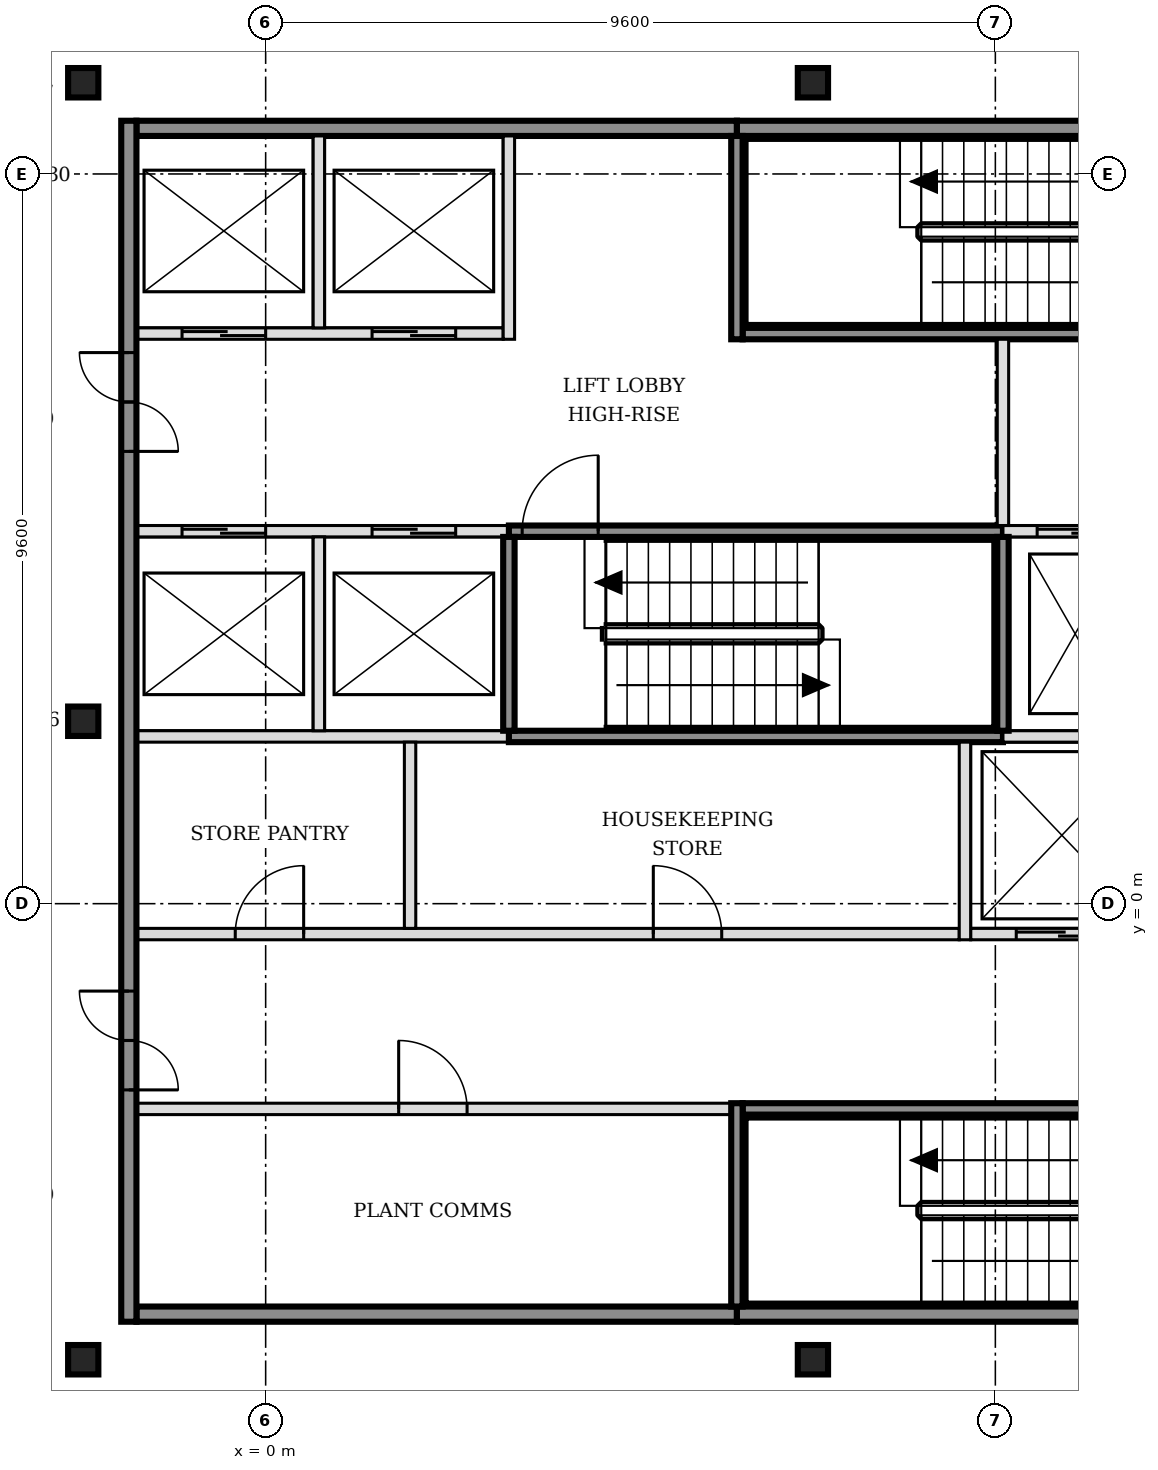
"""IFC4 building model, lengths in metres.
Left out: names, types, materials, properties, quantities, classifications, styles, units other than length and angle.
Written with IfcOpenShell. Run it as: python <this file> out.ifc"""

import sys

from ifc_helpers import new_model, si_unit, direction, frame, frame_2d, origin, origin_2d, place, context, subcontext, project, spatial, rectangle, i_section, extrude, element, fill, save


model = new_model("IFC4")
c1 = context("Model", 3, precision=1e-05, world=origin(), true_north=direction((0.0, 1.0)))
c2 = subcontext(c1, "Body", "Model", "MODEL_VIEW")
j1 = project(units=[si_unit("LENGTHUNIT", "METRE"), si_unit("PLANEANGLEUNIT", "RADIAN")], contexts=[c1])
p1 = place(None, origin())
s1 = spatial("IfcSite", under=j1, at=p1, CompositionType="ELEMENT")
p2 = place(p1, origin())
s2 = spatial("IfcBuilding", under=s1, at=p2, CompositionType="ELEMENT")
p3 = place(p2, frame((0.0, 0.0, 288.6)))
s3 = spatial("IfcBuildingStorey", under=s2, at=p3, CompositionType="ELEMENT", Elevation=288.6)
for number, where, z_axis, x_axis in (
    (1, (-2.4, -6.0, -0.15), (0.0, 0.0, 1.0), (1.0, 0.0, 0.0)),
    (2, (7.2, -6.0, -0.15), (0.0, 0.0, 1.0), (1.0, 0.0, 0.0)),
    (3, (-2.4, 2.4, -0.15), (0.0, 0.0, 1.0), (1.0, 0.0, 0.0)),
    (4, (-2.4, 10.8, -0.15), (0.0, 0.0, 1.0), (1.0, 0.0, 0.0)),
    (5, (7.2, 10.8, -0.15), (0.0, 0.0, 1.0), (1.0, 0.0, 0.0)),
):
    element("IfcColumn", number, at=place(p3, frame(where, z_axis=z_axis, x_axis=x_axis)), inside=s3, PredefinedType="COLUMN", context=c2, shape_type="SweptSolid", body=[
        extrude(i_section(OverallWidth=0.398, OverallDepth=0.387, WebThickness=0.021, FlangeThickness=0.033, FilletRadius=0.015, at=origin_2d()), origin(), (0.0, 0.0, 1.0), 3.6),
    ])
p4 = place(p3, frame((-1.7, -5.4, 0.0), z_axis=(0.0, 0.0, 1.0), x_axis=(1.0, 0.0, 0.0)))
e6 = element("IfcWall", 6, at=p4, inside=s3, PredefinedType="SOLIDWALL", context=c2, shape_type="SweptSolid", body=[
    extrude(rectangle(XDim=7.9, YDim=0.2, at=frame_2d((3.95, 0.0))), origin(), (0.0, 0.0, 1.0), 3.45),
])
p5 = place(p3, frame((6.2, -5.4, 0.0), z_axis=(0.0, 0.0, 1.0), x_axis=(1.0, 0.0, 0.0)))
e7 = element("IfcWall", 7, at=p5, inside=s3, PredefinedType="SOLIDWALL", context=c2, shape_type="SweptSolid", body=[
    extrude(rectangle(XDim=6.5, YDim=0.2, at=frame_2d((3.25, 0.0))), origin(), (0.0, 0.0, 1.0), 3.45),
])
p6 = place(p3, frame((-1.7, -2.7, 0.0), z_axis=(0.0, 0.0, 1.0), x_axis=(1.0, 0.0, 0.0)))
e8 = element("IfcWall", 8, at=p6, inside=s3, PredefinedType="PARTITIONING", context=c2, shape_type="SweptSolid", body=[
    extrude(rectangle(XDim=7.825, YDim=0.15, at=frame_2d((3.913, 0.0))), origin(), (0.0, 0.0, 1.0), 3.45),
])
p7 = place(p6, frame((3.45, 0.0, 0.0)))
e9 = element("IfcOpeningElement", 9, at=p7, cuts=e8, PredefinedType="OPENING", context=c2, shape_type="SweptSolid", body=[
    extrude(rectangle(XDim=0.9, YDim=2.1, at=frame_2d((0.45, 1.05))), frame((0.0, 0.085, 0.0), z_axis=(0.0, -1.0, 0.0), x_axis=(1.0, 0.0, 0.0)), (0.0, 0.0, 1.0), 0.17),
])
p8 = place(p3, frame((6.275, -2.7, 0.0), z_axis=(0.0, 0.0, 1.0), x_axis=(1.0, 0.0, 0.0)))
e10 = element("IfcWall", 10, at=p8, inside=s3, PredefinedType="SOLIDWALL", context=c2, shape_type="SweptSolid", body=[
    extrude(rectangle(XDim=6.35, YDim=0.15, at=frame_2d((3.175, 0.0))), origin(), (0.0, 0.0, 1.0), 3.45),
])
p9 = place(p8, frame((5.225, 0.0, 0.0)))
e11 = element("IfcOpeningElement", 11, at=p9, cuts=e10, PredefinedType="OPENING", context=c2, shape_type="SweptSolid", body=[
    extrude(rectangle(XDim=1.0, YDim=2.1, at=frame_2d((0.5, 1.05))), frame((0.0, 0.085, 0.0), z_axis=(0.0, -1.0, 0.0), x_axis=(1.0, 0.0, 0.0)), (0.0, 0.0, 1.0), 0.17),
])
p10 = place(p3, frame((-1.7, -0.4, 0.0), z_axis=(0.0, 0.0, 1.0), x_axis=(1.0, 0.0, 0.0)))
e12 = element("IfcWall", 12, at=p10, inside=s3, PredefinedType="PARTITIONING", context=c2, shape_type="SweptSolid", body=[
    extrude(rectangle(XDim=10.825, YDim=0.15, at=frame_2d((5.413, 0.0))), origin(), (0.0, 0.0, 1.0), 3.45),
])
p11 = place(p10, frame((1.3, 0.0, 0.0)))
e13 = element("IfcOpeningElement", 13, at=p11, cuts=e12, PredefinedType="OPENING", context=c2, shape_type="SweptSolid", body=[
    extrude(rectangle(XDim=0.9, YDim=2.1, at=frame_2d((0.45, 1.05))), frame((0.0, 0.085, 0.0), z_axis=(0.0, -1.0, 0.0), x_axis=(1.0, 0.0, 0.0)), (0.0, 0.0, 1.0), 0.17),
])
p12 = place(p10, frame((6.8, 0.0, 0.0)))
e14 = element("IfcOpeningElement", 14, at=p12, cuts=e12, PredefinedType="OPENING", context=c2, shape_type="SweptSolid", body=[
    extrude(rectangle(XDim=0.9, YDim=2.1, at=frame_2d((0.45, 1.05))), frame((0.0, 0.085, 0.0), z_axis=(0.0, -1.0, 0.0), x_axis=(1.0, 0.0, 0.0)), (0.0, 0.0, 1.0), 0.17),
])
p13 = place(p3, frame((9.275, -0.4, 0.0), z_axis=(0.0, 0.0, 1.0), x_axis=(1.0, 0.0, 0.0)))
e15 = element("IfcWall", 15, at=p13, inside=s3, PredefinedType="SOLIDWALL", context=c2, shape_type="SweptSolid", body=[
    extrude(rectangle(XDim=4.95, YDim=0.15, at=frame_2d((2.475, 0.0))), origin(), (0.0, 0.0, 1.0), 3.45),
])
p14 = place(p13, frame((0.6, 0.0, 0.0)))
e16 = element("IfcOpeningElement", 16, at=p14, cuts=e15, PredefinedType="OPENING", context=c2, shape_type="SweptSolid", body=[
    extrude(rectangle(XDim=1.2, YDim=2.1, at=frame_2d((0.6, 1.05))), frame((0.0, 0.085, 0.0), z_axis=(0.0, -1.0, 0.0), x_axis=(1.0, 0.0, 0.0)), (0.0, 0.0, 1.0), 0.17),
])
p15 = place(p13, frame((3.15, 0.0, 0.0)))
e17 = element("IfcOpeningElement", 17, at=p15, cuts=e15, PredefinedType="OPENING", context=c2, shape_type="SweptSolid", body=[
    extrude(rectangle(XDim=1.2, YDim=2.1, at=frame_2d((0.6, 1.05))), frame((0.0, 0.085, 0.0), z_axis=(0.0, -1.0, 0.0), x_axis=(1.0, 0.0, 0.0)), (0.0, 0.0, 1.0), 0.17),
])
p16 = place(p3, frame((-1.7, 2.2, 0.0), z_axis=(0.0, 0.0, 1.0), x_axis=(1.0, 0.0, 0.0)))
e18 = element("IfcWall", 18, at=p16, inside=s3, PredefinedType="SOLIDWALL", context=c2, shape_type="SweptSolid", body=[
    extrude(rectangle(XDim=4.9, YDim=0.15, at=frame_2d((2.45, 0.0))), origin(), (0.0, 0.0, 1.0), 3.45),
])
p17 = place(p3, frame((3.2, 2.2, 0.0), z_axis=(0.0, 0.0, 1.0), x_axis=(1.0, 0.0, 0.0)))
e19 = element("IfcWall", 19, at=p17, inside=s3, PredefinedType="SOLIDWALL", context=c2, shape_type="SweptSolid", body=[
    extrude(rectangle(XDim=6.5, YDim=0.15, at=frame_2d((3.25, 0.0))), origin(), (0.0, 0.0, 1.0), 3.45),
])
p18 = place(p3, frame((9.7, 2.2, 0.0), z_axis=(0.0, 0.0, 1.0), x_axis=(1.0, 0.0, 0.0)))
e20 = element("IfcWall", 20, at=p18, inside=s3, PredefinedType="SOLIDWALL", context=c2, shape_type="SweptSolid", body=[
    extrude(rectangle(XDim=4.525, YDim=0.15, at=frame_2d((2.263, 0.0))), origin(), (0.0, 0.0, 1.0), 3.45),
])
p19 = place(p3, frame((-1.7, 4.9, 0.0), z_axis=(0.0, 0.0, 1.0), x_axis=(1.0, 0.0, 0.0)))
e21 = element("IfcWall", 21, at=p19, inside=s3, PredefinedType="SOLIDWALL", context=c2, shape_type="SweptSolid", body=[
    extrude(rectangle(XDim=4.9, YDim=0.15, at=frame_2d((2.45, 0.0))), origin(), (0.0, 0.0, 1.0), 3.45),
])
p20 = place(p19, frame((0.6, 0.0, 0.0)))
e22 = element("IfcOpeningElement", 22, at=p20, cuts=e21, PredefinedType="OPENING", context=c2, shape_type="SweptSolid", body=[
    extrude(rectangle(XDim=1.1, YDim=2.1, at=frame_2d((0.55, 1.05))), frame((0.0, 0.085, 0.0), z_axis=(0.0, -1.0, 0.0), x_axis=(1.0, 0.0, 0.0)), (0.0, 0.0, 1.0), 0.17),
])
p21 = place(p19, frame((3.1, 0.0, 0.0)))
e23 = element("IfcOpeningElement", 23, at=p21, cuts=e21, PredefinedType="OPENING", context=c2, shape_type="SweptSolid", body=[
    extrude(rectangle(XDim=1.1, YDim=2.1, at=frame_2d((0.55, 1.05))), frame((0.0, 0.085, 0.0), z_axis=(0.0, -1.0, 0.0), x_axis=(1.0, 0.0, 0.0)), (0.0, 0.0, 1.0), 0.17),
])
p22 = place(p3, frame((3.2, 4.9, 0.0), z_axis=(0.0, 0.0, 1.0), x_axis=(1.0, 0.0, 0.0)))
e24 = element("IfcWall", 24, at=p22, inside=s3, PredefinedType="SOLIDWALL", context=c2, shape_type="SweptSolid", body=[
    extrude(rectangle(XDim=6.5, YDim=0.15, at=frame_2d((3.25, 0.0))), origin(), (0.0, 0.0, 1.0), 3.45),
])
p23 = place(p22, frame((0.175, 0.0, 0.0)))
e25 = element("IfcOpeningElement", 25, at=p23, cuts=e24, PredefinedType="OPENING", context=c2, shape_type="SweptSolid", body=[
    extrude(rectangle(XDim=1.0, YDim=2.1, at=frame_2d((0.5, 1.05))), frame((0.0, 0.085, 0.0), z_axis=(0.0, -1.0, 0.0), x_axis=(1.0, 0.0, 0.0)), (0.0, 0.0, 1.0), 0.17),
])
p24 = place(p3, frame((9.7, 4.9, 0.0), z_axis=(0.0, 0.0, 1.0), x_axis=(1.0, 0.0, 0.0)))
e26 = element("IfcWall", 26, at=p24, inside=s3, PredefinedType="SOLIDWALL", context=c2, shape_type="SweptSolid", body=[
    extrude(rectangle(XDim=6.4, YDim=0.15, at=frame_2d((3.2, 0.0))), origin(), (0.0, 0.0, 1.0), 3.45),
])
p25 = place(p24, frame((0.45, 0.0, 0.0)))
e27 = element("IfcOpeningElement", 27, at=p25, cuts=e26, PredefinedType="OPENING", context=c2, shape_type="SweptSolid", body=[
    extrude(rectangle(XDim=1.0, YDim=2.1, at=frame_2d((0.5, 1.05))), frame((0.0, 0.085, 0.0), z_axis=(0.0, -1.0, 0.0), x_axis=(1.0, 0.0, 0.0)), (0.0, 0.0, 1.0), 0.17),
])
p26 = place(p24, frame((2.35, 0.0, 0.0)))
e28 = element("IfcOpeningElement", 28, at=p26, cuts=e26, PredefinedType="OPENING", context=c2, shape_type="SweptSolid", body=[
    extrude(rectangle(XDim=1.0, YDim=2.1, at=frame_2d((0.5, 1.05))), frame((0.0, 0.085, 0.0), z_axis=(0.0, -1.0, 0.0), x_axis=(1.0, 0.0, 0.0)), (0.0, 0.0, 1.0), 0.17),
])
p27 = place(p24, frame((4.7, 0.0, 0.0)))
e29 = element("IfcOpeningElement", 29, at=p27, cuts=e26, PredefinedType="OPENING", context=c2, shape_type="SweptSolid", body=[
    extrude(rectangle(XDim=0.9, YDim=2.1, at=frame_2d((0.45, 1.05))), frame((0.0, 0.085, 0.0), z_axis=(0.0, -1.0, 0.0), x_axis=(1.0, 0.0, 0.0)), (0.0, 0.0, 1.0), 0.17),
])
p28 = place(p3, frame((-1.7, 7.5, 0.0), z_axis=(0.0, 0.0, 1.0), x_axis=(1.0, 0.0, 0.0)))
e30 = element("IfcWall", 30, at=p28, inside=s3, PredefinedType="SOLIDWALL", context=c2, shape_type="SweptSolid", body=[
    extrude(rectangle(XDim=4.825, YDim=0.15, at=frame_2d((2.413, 0.0))), origin(), (0.0, 0.0, 1.0), 3.45),
])
p29 = place(p28, frame((0.6, 0.0, 0.0)))
e31 = element("IfcOpeningElement", 31, at=p29, cuts=e30, PredefinedType="OPENING", context=c2, shape_type="SweptSolid", body=[
    extrude(rectangle(XDim=1.1, YDim=2.1, at=frame_2d((0.55, 1.05))), frame((0.0, 0.085, 0.0), z_axis=(0.0, -1.0, 0.0), x_axis=(1.0, 0.0, 0.0)), (0.0, 0.0, 1.0), 0.17),
])
p30 = place(p28, frame((3.1, 0.0, 0.0)))
e32 = element("IfcOpeningElement", 32, at=p30, cuts=e30, PredefinedType="OPENING", context=c2, shape_type="SweptSolid", body=[
    extrude(rectangle(XDim=1.1, YDim=2.1, at=frame_2d((0.55, 1.05))), frame((0.0, 0.085, 0.0), z_axis=(0.0, -1.0, 0.0), x_axis=(1.0, 0.0, 0.0)), (0.0, 0.0, 1.0), 0.17),
])
p31 = place(p3, frame((6.275, 7.5, 0.0), z_axis=(0.0, 0.0, 1.0), x_axis=(1.0, 0.0, 0.0)))
e33 = element("IfcWall", 33, at=p31, inside=s3, PredefinedType="SOLIDWALL", context=c2, shape_type="SweptSolid", body=[
    extrude(rectangle(XDim=6.425, YDim=0.15, at=frame_2d((3.212, 0.0))), origin(), (0.0, 0.0, 1.0), 3.45),
])
p32 = place(p31, frame((5.225, 0.0, 0.0)))
e34 = element("IfcOpeningElement", 34, at=p32, cuts=e33, PredefinedType="OPENING", context=c2, shape_type="SweptSolid", body=[
    extrude(rectangle(XDim=1.0, YDim=2.1, at=frame_2d((0.5, 1.05))), frame((0.0, 0.085, 0.0), z_axis=(0.0, -1.0, 0.0), x_axis=(1.0, 0.0, 0.0)), (0.0, 0.0, 1.0), 0.17),
])
p33 = place(p3, frame((-1.7, 10.2, 0.0), z_axis=(0.0, 0.0, 1.0), x_axis=(1.0, 0.0, 0.0)))
e35 = element("IfcWall", 35, at=p33, inside=s3, PredefinedType="SOLIDWALL", context=c2, shape_type="SweptSolid", body=[
    extrude(rectangle(XDim=7.9, YDim=0.2, at=frame_2d((3.95, 0.0))), origin(), (0.0, 0.0, 1.0), 3.45),
])
p34 = place(p3, frame((6.2, 10.2, 0.0), z_axis=(0.0, 0.0, 1.0), x_axis=(1.0, 0.0, 0.0)))
e36 = element("IfcWall", 36, at=p34, inside=s3, PredefinedType="SOLIDWALL", context=c2, shape_type="SweptSolid", body=[
    extrude(rectangle(XDim=6.5, YDim=0.2, at=frame_2d((3.25, 0.0))), origin(), (0.0, 0.0, 1.0), 3.45),
])
p35 = place(p3, frame((-1.8, -5.5, 0.0), z_axis=(0.0, 0.0, 1.0), x_axis=(0.0, 1.0, 0.0)))
e37 = element("IfcWall", 37, at=p35, inside=s3, PredefinedType="SOLIDWALL", context=c2, shape_type="SweptSolid", body=[
    extrude(rectangle(XDim=15.8, YDim=0.2, at=frame_2d((7.9, 0.0))), origin(), (0.0, 0.0, 1.0), 3.45),
])
p36 = place(p35, frame((3.05, 0.0, 0.0)))
e38 = element("IfcOpeningElement", 38, at=p36, cuts=e37, PredefinedType="OPENING", context=c2, shape_type="SweptSolid", body=[
    extrude(rectangle(XDim=1.3, YDim=2.1, at=frame_2d((0.65, 1.05))), frame((0.0, 0.11, 0.0), z_axis=(0.0, -1.0, 0.0), x_axis=(1.0, 0.0, 0.0)), (0.0, 0.0, 1.0), 0.22),
])
p37 = place(p35, frame((11.45, 0.0, 0.0)))
e39 = element("IfcOpeningElement", 39, at=p37, cuts=e37, PredefinedType="OPENING", context=c2, shape_type="SweptSolid", body=[
    extrude(rectangle(XDim=1.3, YDim=2.1, at=frame_2d((0.65, 1.05))), frame((0.0, 0.11, 0.0), z_axis=(0.0, -1.0, 0.0), x_axis=(1.0, 0.0, 0.0)), (0.0, 0.0, 1.0), 0.22),
])
p38 = place(p3, frame((0.7, 2.275, 0.0), z_axis=(0.0, 0.0, 1.0), x_axis=(0.0, 1.0, 0.0)))
e40 = element("IfcWall", 40, at=p38, inside=s3, PredefinedType="SOLIDWALL", context=c2, shape_type="SweptSolid", body=[
    extrude(rectangle(XDim=2.55, YDim=0.15, at=frame_2d((1.275, 0.0))), origin(), (0.0, 0.0, 1.0), 3.45),
])
p39 = place(p3, frame((0.7, 7.575, 0.0), z_axis=(0.0, 0.0, 1.0), x_axis=(0.0, 1.0, 0.0)))
e41 = element("IfcWall", 41, at=p39, inside=s3, PredefinedType="SOLIDWALL", context=c2, shape_type="SweptSolid", body=[
    extrude(rectangle(XDim=2.525, YDim=0.15, at=frame_2d((1.263, 0.0))), origin(), (0.0, 0.0, 1.0), 3.45),
])
p40 = place(p3, frame((1.9, -0.325, 0.0), z_axis=(0.0, 0.0, 1.0), x_axis=(0.0, 1.0, 0.0)))
e42 = element("IfcWall", 42, at=p40, inside=s3, PredefinedType="PARTITIONING", context=c2, shape_type="SweptSolid", body=[
    extrude(rectangle(XDim=2.45, YDim=0.15, at=frame_2d((1.225, 0.0))), origin(), (0.0, 0.0, 1.0), 3.45),
])
p41 = place(p3, frame((3.2, 2.275, 0.0), z_axis=(0.0, 0.0, 1.0), x_axis=(0.0, 1.0, 0.0)))
e43 = element("IfcWall", 43, at=p41, inside=s3, PredefinedType="SOLIDWALL", context=c2, shape_type="SweptSolid", body=[
    extrude(rectangle(XDim=2.55, YDim=0.15, at=frame_2d((1.275, 0.0))), origin(), (0.0, 0.0, 1.0), 3.45),
])
for number, where, z_axis, x_axis in (
    (44, (3.2, 7.425, 0.0), (0.0, 0.0, 1.0), (0.0, 1.0, 0.0)),
    (45, (6.2, -5.3, 0.0), (0.0, 0.0, 1.0), (0.0, 1.0, 0.0)),
    (46, (6.2, 7.425, 0.0), (0.0, 0.0, 1.0), (0.0, 1.0, 0.0)),
):
    element("IfcWall", number, at=place(p3, frame(where, z_axis=z_axis, x_axis=x_axis)), inside=s3, PredefinedType="SOLIDWALL", context=c2, shape_type="SweptSolid", body=[
        extrude(rectangle(XDim=2.675, YDim=0.15, at=frame_2d((1.337, 0.0))), origin(), (0.0, 0.0, 1.0), 3.45),
    ])
p42 = place(p3, frame((9.2, -0.475, 0.0), z_axis=(0.0, 0.0, 1.0), x_axis=(0.0, 1.0, 0.0)))
e47 = element("IfcWall", 47, at=p42, inside=s3, PredefinedType="SOLIDWALL", context=c2, shape_type="SweptSolid", body=[
    extrude(rectangle(XDim=2.6, YDim=0.15, at=frame_2d((1.3, 0.0))), origin(), (0.0, 0.0, 1.0), 3.45),
])
p43 = place(p3, frame((9.7, 2.275, 0.0), z_axis=(0.0, 0.0, 1.0), x_axis=(0.0, 1.0, 0.0)))
e48 = element("IfcWall", 48, at=p43, inside=s3, PredefinedType="SOLIDWALL", context=c2, shape_type="SweptSolid", body=[
    extrude(rectangle(XDim=2.55, YDim=0.15, at=frame_2d((1.275, 0.0))), origin(), (0.0, 0.0, 1.0), 3.45),
])
p44 = place(p3, frame((9.7, 4.975, 0.0), z_axis=(0.0, 0.0, 1.0), x_axis=(0.0, 1.0, 0.0)))
e49 = element("IfcWall", 49, at=p44, inside=s3, PredefinedType="SOLIDWALL", context=c2, shape_type="SweptSolid", body=[
    extrude(rectangle(XDim=2.45, YDim=0.15, at=frame_2d((1.225, 0.0))), origin(), (0.0, 0.0, 1.0), 3.45),
])
p45 = place(p14, origin())
e50 = element("IfcDoor", 50, at=p45, inside=s3, OperationType="DOUBLE_DOOR_SLIDING", PredefinedType="DOOR", context=c2, shape_type="SweptSolid", body=[
    extrude(rectangle(XDim=1.2, YDim=2.1, at=frame_2d((0.6, 1.05))), frame((0.0, 0.025, 0.0), z_axis=(0.0, -1.0, 0.0), x_axis=(1.0, 0.0, 0.0)), (0.0, 0.0, 1.0), 0.05),
])
fill(e16, e50)
p46 = place(p20, origin())
e51 = element("IfcDoor", 51, at=p46, inside=s3, OperationType="DOUBLE_DOOR_SLIDING", PredefinedType="DOOR", context=c2, shape_type="SweptSolid", body=[
    extrude(rectangle(XDim=1.1, YDim=2.1, at=frame_2d((0.55, 1.05))), frame((0.0, 0.025, 0.0), z_axis=(0.0, -1.0, 0.0), x_axis=(1.0, 0.0, 0.0)), (0.0, 0.0, 1.0), 0.05),
])
fill(e22, e51)
p47 = place(p21, origin())
e52 = element("IfcDoor", 52, at=p47, inside=s3, OperationType="DOUBLE_DOOR_SLIDING", PredefinedType="DOOR", context=c2, shape_type="SweptSolid", body=[
    extrude(rectangle(XDim=1.1, YDim=2.1, at=frame_2d((0.55, 1.05))), frame((0.0, 0.025, 0.0), z_axis=(0.0, -1.0, 0.0), x_axis=(1.0, 0.0, 0.0)), (0.0, 0.0, 1.0), 0.05),
])
fill(e23, e52)
p48 = place(p29, origin())
e53 = element("IfcDoor", 53, at=p48, inside=s3, OperationType="DOUBLE_DOOR_SLIDING", PredefinedType="DOOR", context=c2, shape_type="SweptSolid", body=[
    extrude(rectangle(XDim=1.1, YDim=2.1, at=frame_2d((0.55, 1.05))), frame((0.0, 0.025, 0.0), z_axis=(0.0, -1.0, 0.0), x_axis=(1.0, 0.0, 0.0)), (0.0, 0.0, 1.0), 0.05),
])
fill(e31, e53)
p49 = place(p30, origin())
e54 = element("IfcDoor", 54, at=p49, inside=s3, OperationType="DOUBLE_DOOR_SLIDING", PredefinedType="DOOR", context=c2, shape_type="SweptSolid", body=[
    extrude(rectangle(XDim=1.1, YDim=2.1, at=frame_2d((0.55, 1.05))), frame((0.0, 0.025, 0.0), z_axis=(0.0, -1.0, 0.0), x_axis=(1.0, 0.0, 0.0)), (0.0, 0.0, 1.0), 0.05),
])
fill(e32, e54)
p50 = place(p25, origin())
e55 = element("IfcDoor", 55, at=p50, inside=s3, OperationType="DOUBLE_DOOR_SLIDING", PredefinedType="DOOR", context=c2, shape_type="SweptSolid", body=[
    extrude(rectangle(XDim=1.0, YDim=2.1, at=frame_2d((0.5, 1.05))), frame((0.0, 0.025, 0.0), z_axis=(0.0, -1.0, 0.0), x_axis=(1.0, 0.0, 0.0)), (0.0, 0.0, 1.0), 0.05),
])
fill(e27, e55)
p51 = place(p23, origin())
e56 = element("IfcDoor", 56, at=p51, inside=s3, OperationType="SINGLE_SWING_RIGHT", PredefinedType="DOOR", context=c2, shape_type="SweptSolid", body=[
    extrude(rectangle(XDim=1.0, YDim=2.1, at=frame_2d((0.5, 1.05))), frame((0.0, 0.025, 0.0), z_axis=(0.0, -1.0, 0.0), x_axis=(1.0, 0.0, 0.0)), (0.0, 0.0, 1.0), 0.05),
])
fill(e25, e56)
p52 = place(p36, origin())
e57 = element("IfcDoor", 57, at=p52, inside=s3, OperationType="DOUBLE_DOOR_SINGLE_SWING", PredefinedType="DOOR", context=c2, shape_type="SweptSolid", body=[
    extrude(rectangle(XDim=1.3, YDim=2.1, at=frame_2d((0.65, 1.05))), frame((0.0, 0.025, 0.0), z_axis=(0.0, -1.0, 0.0), x_axis=(1.0, 0.0, 0.0)), (0.0, 0.0, 1.0), 0.05),
])
fill(e38, e57)
p53 = place(p37, origin())
e58 = element("IfcDoor", 58, at=p53, inside=s3, OperationType="DOUBLE_DOOR_SINGLE_SWING", PredefinedType="DOOR", context=c2, shape_type="SweptSolid", body=[
    extrude(rectangle(XDim=1.3, YDim=2.1, at=frame_2d((0.65, 1.05))), frame((0.0, 0.025, 0.0), z_axis=(0.0, -1.0, 0.0), x_axis=(1.0, 0.0, 0.0)), (0.0, 0.0, 1.0), 0.05),
])
fill(e39, e58)
p54 = place(p7, origin())
e59 = element("IfcDoor", 59, at=p54, inside=s3, OperationType="SINGLE_SWING_LEFT", PredefinedType="DOOR", context=c2, shape_type="SweptSolid", body=[
    extrude(rectangle(XDim=0.9, YDim=2.1, at=frame_2d((0.45, 1.05))), frame((0.0, 0.025, 0.0), z_axis=(0.0, -1.0, 0.0), x_axis=(1.0, 0.0, 0.0)), (0.0, 0.0, 1.0), 0.05),
])
fill(e9, e59)
p55 = place(p11, origin())
e60 = element("IfcDoor", 60, at=p55, inside=s3, OperationType="SINGLE_SWING_RIGHT", PredefinedType="DOOR", context=c2, shape_type="SweptSolid", body=[
    extrude(rectangle(XDim=0.9, YDim=2.1, at=frame_2d((0.45, 1.05))), frame((0.0, 0.025, 0.0), z_axis=(0.0, -1.0, 0.0), x_axis=(1.0, 0.0, 0.0)), (0.0, 0.0, 1.0), 0.05),
])
fill(e13, e60)
p56 = place(p12, origin())
e61 = element("IfcDoor", 61, at=p56, inside=s3, OperationType="SINGLE_SWING_LEFT", PredefinedType="DOOR", context=c2, shape_type="SweptSolid", body=[
    extrude(rectangle(XDim=0.9, YDim=2.1, at=frame_2d((0.45, 1.05))), frame((0.0, 0.025, 0.0), z_axis=(0.0, -1.0, 0.0), x_axis=(1.0, 0.0, 0.0)), (0.0, 0.0, 1.0), 0.05),
])
fill(e14, e61)
save(model, sys.argv[1])
